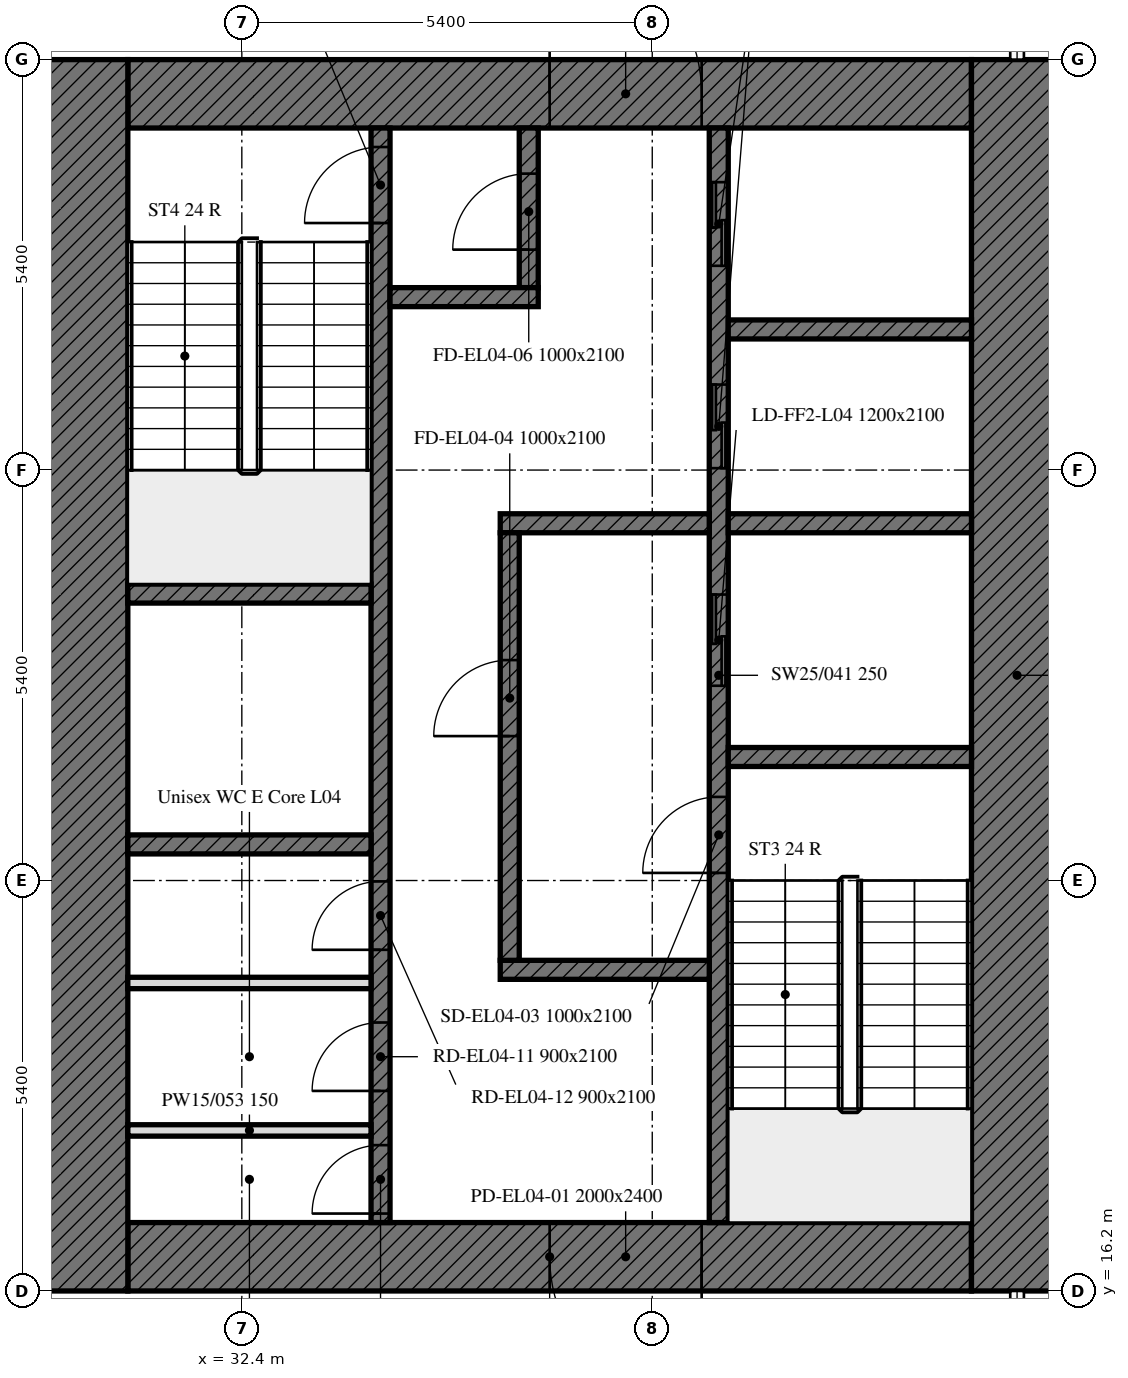
"""IFC4 building model, lengths in metres.
Left out: names, types, materials, properties, quantities, classifications, styles, units other than length and angle.
Written with IfcOpenShell. Run it as: python <this file> out.ifc"""

import sys

from ifc_helpers import new_model, si_unit, direction, frame, frame_2d, origin, place, context, subcontext, project, spatial, rectangle, extrude, element, fill, save


model = new_model("IFC4")
c1 = context("Model", 3, precision=1e-05, world=origin(), true_north=direction((0.0, 1.0)))
c2 = subcontext(c1, "Body", "Model", "MODEL_VIEW")
j1 = project(units=[si_unit("LENGTHUNIT", "METRE"), si_unit("PLANEANGLEUNIT", "RADIAN")], contexts=[c1])
p1 = place(None, origin())
s1 = spatial("IfcSite", under=j1, at=p1, CompositionType="ELEMENT")
p2 = place(p1, origin())
s2 = spatial("IfcBuilding", under=s1, at=p2, CompositionType="ELEMENT")
p3 = place(p2, frame((0.0, 0.0, 24.6)))
s3 = spatial("IfcBuildingStorey", under=s2, at=p3, CompositionType="ELEMENT", Elevation=24.6)
p4 = place(p3, frame((42.0, 16.65, 0.0), z_axis=(0.0, 0.0, 1.0), x_axis=(-1.0, 0.0, 0.0)))
e1 = element("IfcWall", 1, at=p4, inside=s3, PredefinedType="SOLIDWALL", context=c2, shape_type="SweptSolid", body=[
    extrude(rectangle(XDim=11.1, YDim=0.9, at=frame_2d((5.55, 0.0))), origin(), (0.0, 0.0, 1.0), 4.1),
])
p5 = place(p4, frame((3.55, 0.0, 0.0)))
e2 = element("IfcOpeningElement", 2, at=p5, cuts=e1, PredefinedType="OPENING", context=c2, shape_type="SweptSolid", body=[
    extrude(rectangle(XDim=2.0, YDim=2.4, at=frame_2d((1.0, 1.2))), frame((0.0, 0.45, 0.0), z_axis=(0.0, -1.0, 0.0), x_axis=(1.0, 0.0, 0.0)), (0.0, 0.0, 1.0), 0.9),
])
p6 = place(p3, frame((30.9, 31.95, 0.0), z_axis=(0.0, 0.0, 1.0), x_axis=(1.0, 0.0, 0.0)))
e3 = element("IfcWall", 3, at=p6, inside=s3, PredefinedType="SOLIDWALL", context=c2, shape_type="SweptSolid", body=[
    extrude(rectangle(XDim=11.1, YDim=0.9, at=frame_2d((5.55, 0.0))), origin(), (0.0, 0.0, 1.0), 4.1),
])
p7 = place(p6, frame((5.55, 0.0, 0.0)))
e4 = element("IfcOpeningElement", 4, at=p7, cuts=e3, PredefinedType="OPENING", context=c2, shape_type="SweptSolid", body=[
    extrude(rectangle(XDim=2.0, YDim=2.4, at=frame_2d((1.0, 1.2))), frame((0.0, 0.45, 0.0), z_axis=(0.0, -1.0, 0.0), x_axis=(1.0, 0.0, 0.0)), (0.0, 0.0, 1.0), 0.9),
])
for number, where, z_axis, x_axis in (
    (5, (42.6, 32.4, 0.0), (0.0, 0.0, 1.0), (0.0, -1.0, 0.0)),
    (6, (30.3, 16.2, 0.0), (0.0, 0.0, 1.0), (0.0, 1.0, 0.0)),
):
    element("IfcWall", number, at=place(p3, frame(where, z_axis=z_axis, x_axis=x_axis)), inside=s3, PredefinedType="SOLIDWALL", context=c2, shape_type="SweptSolid", body=[
        extrude(rectangle(XDim=16.2, YDim=1.2, at=frame_2d((8.1, 0.0))), origin(), (0.0, 0.0, 1.0), 4.1),
    ])
p8 = place(p3, frame((38.675, 17.1, 0.0), z_axis=(0.0, 0.0, 1.0), x_axis=(0.0, 1.0, 0.0)))
e7 = element("IfcWall", 7, at=p8, inside=s3, PredefinedType="SOLIDWALL", context=c2, shape_type="SweptSolid", body=[
    extrude(rectangle(XDim=14.4, YDim=0.25, at=frame_2d((7.2, 0.0))), origin(), (0.0, 0.0, 1.0), 4.1),
])
p9 = place(p8, frame((4.6, 0.0, 0.0)))
e8 = element("IfcOpeningElement", 8, at=p9, cuts=e7, PredefinedType="OPENING", context=c2, shape_type="SweptSolid", body=[
    extrude(rectangle(XDim=1.0, YDim=2.1, at=frame_2d((0.5, 1.05))), frame((0.0, 0.125, 0.0), z_axis=(0.0, -1.0, 0.0), x_axis=(1.0, 0.0, 0.0)), (0.0, 0.0, 1.0), 0.25),
])
p10 = place(p8, frame((7.062, 0.0, 0.0)))
e9 = element("IfcOpeningElement", 9, at=p10, cuts=e7, PredefinedType="OPENING", context=c2, shape_type="SweptSolid", body=[
    extrude(rectangle(XDim=1.2, YDim=2.1, at=frame_2d((0.6, 1.05))), frame((0.0, 0.125, 0.0), z_axis=(0.0, -1.0, 0.0), x_axis=(1.0, 0.0, 0.0)), (0.0, 0.0, 1.0), 0.25),
])
p11 = place(p8, frame((9.925, 0.0, 0.0)))
e10 = element("IfcOpeningElement", 10, at=p11, cuts=e7, PredefinedType="OPENING", context=c2, shape_type="SweptSolid", body=[
    extrude(rectangle(XDim=1.1, YDim=2.1, at=frame_2d((0.55, 1.05))), frame((0.0, 0.125, 0.0), z_axis=(0.0, -1.0, 0.0), x_axis=(1.0, 0.0, 0.0)), (0.0, 0.0, 1.0), 0.25),
])
p12 = place(p8, frame((12.587, 0.0, 0.0)))
e11 = element("IfcOpeningElement", 11, at=p12, cuts=e7, PredefinedType="OPENING", context=c2, shape_type="SweptSolid", body=[
    extrude(rectangle(XDim=1.1, YDim=2.1, at=frame_2d((0.55, 1.05))), frame((0.0, 0.125, 0.0), z_axis=(0.0, -1.0, 0.0), x_axis=(1.0, 0.0, 0.0)), (0.0, 0.0, 1.0), 0.25),
])
p13 = place(p3, frame((34.225, 17.1, 0.0), z_axis=(0.0, 0.0, 1.0), x_axis=(0.0, 1.0, 0.0)))
e12 = element("IfcWall", 12, at=p13, inside=s3, PredefinedType="SOLIDWALL", context=c2, shape_type="SweptSolid", body=[
    extrude(rectangle(XDim=14.4, YDim=0.25, at=frame_2d((7.2, 0.0))), origin(), (0.0, 0.0, 1.0), 4.1),
])
p14 = place(p13, frame((13.15, 0.0, 0.0)))
e13 = element("IfcOpeningElement", 13, at=p14, cuts=e12, PredefinedType="OPENING", context=c2, shape_type="SweptSolid", body=[
    extrude(rectangle(XDim=1.0, YDim=2.1, at=frame_2d((0.5, 1.05))), frame((0.0, 0.125, 0.0), z_axis=(0.0, -1.0, 0.0), x_axis=(1.0, 0.0, 0.0)), (0.0, 0.0, 1.0), 0.25),
])
p15 = place(p13, frame((0.118, 0.0, 0.0)))
e14 = element("IfcOpeningElement", 14, at=p15, cuts=e12, PredefinedType="OPENING", context=c2, shape_type="SweptSolid", body=[
    extrude(rectangle(XDim=0.9, YDim=2.1, at=frame_2d((0.45, 1.05))), frame((0.0, 0.125, 0.0), z_axis=(0.0, -1.0, 0.0), x_axis=(1.0, 0.0, 0.0)), (0.0, 0.0, 1.0), 0.25),
])
p16 = place(p13, frame((1.732, 0.0, 0.0)))
e15 = element("IfcOpeningElement", 15, at=p16, cuts=e12, PredefinedType="OPENING", context=c2, shape_type="SweptSolid", body=[
    extrude(rectangle(XDim=0.9, YDim=2.1, at=frame_2d((0.45, 1.05))), frame((0.0, 0.125, 0.0), z_axis=(0.0, -1.0, 0.0), x_axis=(1.0, 0.0, 0.0)), (0.0, 0.0, 1.0), 0.25),
])
p17 = place(p13, frame((3.588, 0.0, 0.0)))
e16 = element("IfcOpeningElement", 16, at=p17, cuts=e12, PredefinedType="OPENING", context=c2, shape_type="SweptSolid", body=[
    extrude(rectangle(XDim=0.9, YDim=2.1, at=frame_2d((0.45, 1.05))), frame((0.0, 0.125, 0.0), z_axis=(0.0, -1.0, 0.0), x_axis=(1.0, 0.0, 0.0)), (0.0, 0.0, 1.0), 0.25),
])
p18 = place(p3, frame((38.8, 23.225, 0.0), z_axis=(0.0, 0.0, 1.0), x_axis=(1.0, 0.0, 0.0)))
e17 = element("IfcWall", 17, at=p18, inside=s3, PredefinedType="SOLIDWALL", context=c2, shape_type="SweptSolid", body=[
    extrude(rectangle(XDim=3.2, YDim=0.25, at=frame_2d((1.6, 0.0))), origin(), (0.0, 0.0, 1.0), 4.1),
])
for number, where, z_axis, x_axis in (
    (18, (30.9, 25.375, 0.0), (0.0, 0.0, 1.0), (1.0, 0.0, 0.0)),
    (19, (30.9, 22.075, 0.0), (0.0, 0.0, 1.0), (1.0, 0.0, 0.0)),
):
    element("IfcWall", number, at=place(p3, frame(where, z_axis=z_axis, x_axis=x_axis)), inside=s3, PredefinedType="SOLIDWALL", context=c2, shape_type="SweptSolid", body=[
        extrude(rectangle(XDim=3.2, YDim=0.25, at=frame_2d((1.6, 0.0))), origin(), (0.0, 0.0, 1.0), 4.1),
    ])
p19 = place(p3, frame((38.8, 26.3, 0.0), z_axis=(0.0, 0.0, 1.0), x_axis=(1.0, 0.0, 0.0)))
e20 = element("IfcWall", 20, at=p19, inside=s3, PredefinedType="SOLIDWALL", context=c2, shape_type="SweptSolid", body=[
    extrude(rectangle(XDim=3.2, YDim=0.25, at=frame_2d((1.6, 0.0))), origin(), (0.0, 0.0, 1.0), 4.1),
])
for number, where, z_axis, x_axis in (
    (21, (35.8, 26.3, 0.0), (0.0, 0.0, 1.0), (1.0, 0.0, 0.0)),
    (22, (35.8, 20.425, 0.0), (0.0, 0.0, 1.0), (1.0, 0.0, 0.0)),
):
    element("IfcWall", number, at=place(p3, frame(where, z_axis=z_axis, x_axis=x_axis)), inside=s3, PredefinedType="SOLIDWALL", context=c2, shape_type="SweptSolid", body=[
        extrude(rectangle(XDim=2.75, YDim=0.25, at=frame_2d((1.375, 0.0))), origin(), (0.0, 0.0, 1.0), 4.1),
    ])
p20 = place(p3, frame((36.175, 29.4, 0.0), z_axis=(0.0, 0.0, 1.0), x_axis=(0.0, 1.0, 0.0)))
e23 = element("IfcWall", 23, at=p20, inside=s3, PredefinedType="SOLIDWALL", context=c2, shape_type="SweptSolid", body=[
    extrude(rectangle(XDim=2.1, YDim=0.25, at=frame_2d((1.05, 0.0))), origin(), (0.0, 0.0, 1.0), 4.1),
])
p21 = place(p20, frame((0.5, 0.0, 0.0)))
e24 = element("IfcOpeningElement", 24, at=p21, cuts=e23, PredefinedType="OPENING", context=c2, shape_type="SweptSolid", body=[
    extrude(rectangle(XDim=1.0, YDim=2.1, at=frame_2d((0.5, 1.05))), frame((0.0, 0.125, 0.0), z_axis=(0.0, -1.0, 0.0), x_axis=(1.0, 0.0, 0.0)), (0.0, 0.0, 1.0), 0.25),
])
p22 = place(p3, frame((34.35, 29.275, 0.0), z_axis=(0.0, 0.0, 1.0), x_axis=(1.0, 0.0, 0.0)))
e25 = element("IfcWall", 25, at=p22, inside=s3, PredefinedType="SOLIDWALL", context=c2, shape_type="SweptSolid", body=[
    extrude(rectangle(XDim=1.95, YDim=0.25, at=frame_2d((0.975, 0.0))), origin(), (0.0, 0.0, 1.0), 4.1),
])
p23 = place(p3, frame((35.925, 20.55, 0.0), z_axis=(0.0, 0.0, 1.0), x_axis=(0.0, 1.0, 0.0)))
e26 = element("IfcWall", 26, at=p23, inside=s3, PredefinedType="SOLIDWALL", context=c2, shape_type="SweptSolid", body=[
    extrude(rectangle(XDim=5.625, YDim=0.25, at=frame_2d((2.812, 0.0))), origin(), (0.0, 0.0, 1.0), 4.1),
])
p24 = place(p23, frame((2.95, 0.0, 0.0)))
e27 = element("IfcOpeningElement", 27, at=p24, cuts=e26, PredefinedType="OPENING", context=c2, shape_type="SweptSolid", body=[
    extrude(rectangle(XDim=1.0, YDim=2.1, at=frame_2d((0.5, 1.05))), frame((0.0, 0.125, 0.0), z_axis=(0.0, -1.0, 0.0), x_axis=(1.0, 0.0, 0.0)), (0.0, 0.0, 1.0), 0.25),
])
p25 = place(p3, frame((38.8, 28.85, 0.0), z_axis=(0.0, 0.0, 1.0), x_axis=(1.0, 0.0, 0.0)))
e28 = element("IfcWall", 28, at=p25, inside=s3, PredefinedType="SOLIDWALL", context=c2, shape_type="SweptSolid", body=[
    extrude(rectangle(XDim=3.2, YDim=0.25, at=frame_2d((1.6, 0.0))), origin(), (0.0, 0.0, 1.0), 4.1),
])
for number, where, z_axis, x_axis in (
    (29, (30.9, 18.312, 0.0), (0.0, 0.0, 1.0), (1.0, 0.0, 0.0)),
    (30, (30.9, 20.252, 0.0), (0.0, 0.0, 1.0), (1.0, 0.0, 0.0)),
):
    element("IfcWall", number, at=place(p3, frame(where, z_axis=z_axis, x_axis=x_axis)), inside=s3, PredefinedType="PARTITIONING", context=c2, shape_type="SweptSolid", body=[
        extrude(rectangle(XDim=3.2, YDim=0.15, at=frame_2d((1.6, 0.0))), origin(), (0.0, 0.0, 1.0), 4.1),
    ])
p26 = place(p5, origin())
e31 = element("IfcDoor", 31, at=p26, inside=s3, OperationType="DOUBLE_DOOR_SINGLE_SWING", PredefinedType="DOOR", context=c2, shape_type="SweptSolid", body=[
    extrude(rectangle(XDim=2.0, YDim=2.4, at=frame_2d((1.0, 1.2))), frame((0.0, 0.025, 0.0), z_axis=(0.0, -1.0, 0.0), x_axis=(1.0, 0.0, 0.0)), (0.0, 0.0, 1.0), 0.05),
])
fill(e2, e31)
p27 = place(p7, origin())
e32 = element("IfcDoor", 32, at=p27, inside=s3, OperationType="DOUBLE_DOOR_SINGLE_SWING", PredefinedType="DOOR", context=c2, shape_type="SweptSolid", body=[
    extrude(rectangle(XDim=2.0, YDim=2.4, at=frame_2d((1.0, 1.2))), frame((0.0, 0.025, 0.0), z_axis=(0.0, -1.0, 0.0), x_axis=(1.0, 0.0, 0.0)), (0.0, 0.0, 1.0), 0.05),
])
fill(e4, e32)
p28 = place(p9, origin())
e33 = element("IfcDoor", 33, at=p28, inside=s3, OperationType="SINGLE_SWING_LEFT", PredefinedType="DOOR", context=c2, shape_type="SweptSolid", body=[
    extrude(rectangle(XDim=1.0, YDim=2.1, at=frame_2d((0.5, 1.05))), frame((0.0, 0.025, 0.0), z_axis=(0.0, -1.0, 0.0), x_axis=(1.0, 0.0, 0.0)), (0.0, 0.0, 1.0), 0.05),
])
fill(e8, e33)
p29 = place(p24, origin())
e34 = element("IfcDoor", 34, at=p29, inside=s3, OperationType="SINGLE_SWING_LEFT", PredefinedType="DOOR", context=c2, shape_type="SweptSolid", body=[
    extrude(rectangle(XDim=1.0, YDim=2.1, at=frame_2d((0.5, 1.05))), frame((0.0, 0.025, 0.0), z_axis=(0.0, -1.0, 0.0), x_axis=(1.0, 0.0, 0.0)), (0.0, 0.0, 1.0), 0.05),
])
fill(e27, e34)
p30 = place(p14, origin())
e35 = element("IfcDoor", 35, at=p30, inside=s3, OperationType="SINGLE_SWING_LEFT", PredefinedType="DOOR", context=c2, shape_type="SweptSolid", body=[
    extrude(rectangle(XDim=1.0, YDim=2.1, at=frame_2d((0.5, 1.05))), frame((0.0, 0.025, 0.0), z_axis=(0.0, -1.0, 0.0), x_axis=(1.0, 0.0, 0.0)), (0.0, 0.0, 1.0), 0.05),
])
fill(e13, e35)
p31 = place(p21, origin())
e36 = element("IfcDoor", 36, at=p31, inside=s3, OperationType="SINGLE_SWING_LEFT", PredefinedType="DOOR", context=c2, shape_type="SweptSolid", body=[
    extrude(rectangle(XDim=1.0, YDim=2.1, at=frame_2d((0.5, 1.05))), frame((0.0, 0.025, 0.0), z_axis=(0.0, -1.0, 0.0), x_axis=(1.0, 0.0, 0.0)), (0.0, 0.0, 1.0), 0.05),
])
fill(e24, e36)
p32 = place(p10, origin())
e37 = element("IfcDoor", 37, at=p32, inside=s3, OperationType="DOUBLE_DOOR_SLIDING", PredefinedType="DOOR", context=c2, shape_type="SweptSolid", body=[
    extrude(rectangle(XDim=1.2, YDim=2.1, at=frame_2d((0.6, 1.05))), frame((0.0, 0.025, 0.0), z_axis=(0.0, -1.0, 0.0), x_axis=(1.0, 0.0, 0.0)), (0.0, 0.0, 1.0), 0.05),
])
fill(e9, e37)
p33 = place(p11, origin())
e38 = element("IfcDoor", 38, at=p33, inside=s3, OperationType="DOUBLE_DOOR_SLIDING", PredefinedType="DOOR", context=c2, shape_type="SweptSolid", body=[
    extrude(rectangle(XDim=1.1, YDim=2.1, at=frame_2d((0.55, 1.05))), frame((0.0, 0.025, 0.0), z_axis=(0.0, -1.0, 0.0), x_axis=(1.0, 0.0, 0.0)), (0.0, 0.0, 1.0), 0.05),
])
fill(e10, e38)
p34 = place(p12, origin())
e39 = element("IfcDoor", 39, at=p34, inside=s3, OperationType="DOUBLE_DOOR_SLIDING", PredefinedType="DOOR", context=c2, shape_type="SweptSolid", body=[
    extrude(rectangle(XDim=1.1, YDim=2.1, at=frame_2d((0.55, 1.05))), frame((0.0, 0.025, 0.0), z_axis=(0.0, -1.0, 0.0), x_axis=(1.0, 0.0, 0.0)), (0.0, 0.0, 1.0), 0.05),
])
fill(e11, e39)
p35 = place(p15, origin())
e40 = element("IfcDoor", 40, at=p35, inside=s3, OperationType="SINGLE_SWING_LEFT", PredefinedType="DOOR", context=c2, shape_type="SweptSolid", body=[
    extrude(rectangle(XDim=0.9, YDim=2.1, at=frame_2d((0.45, 1.05))), frame((0.0, 0.025, 0.0), z_axis=(0.0, -1.0, 0.0), x_axis=(1.0, 0.0, 0.0)), (0.0, 0.0, 1.0), 0.05),
])
fill(e14, e40)
p36 = place(p16, origin())
e41 = element("IfcDoor", 41, at=p36, inside=s3, OperationType="SINGLE_SWING_LEFT", PredefinedType="DOOR", context=c2, shape_type="SweptSolid", body=[
    extrude(rectangle(XDim=0.9, YDim=2.1, at=frame_2d((0.45, 1.05))), frame((0.0, 0.025, 0.0), z_axis=(0.0, -1.0, 0.0), x_axis=(1.0, 0.0, 0.0)), (0.0, 0.0, 1.0), 0.05),
])
fill(e15, e41)
p37 = place(p17, origin())
e42 = element("IfcDoor", 42, at=p37, inside=s3, OperationType="SINGLE_SWING_LEFT", PredefinedType="DOOR", context=c2, shape_type="SweptSolid", body=[
    extrude(rectangle(XDim=0.9, YDim=2.1, at=frame_2d((0.45, 1.05))), frame((0.0, 0.025, 0.0), z_axis=(0.0, -1.0, 0.0), x_axis=(1.0, 0.0, 0.0)), (0.0, 0.0, 1.0), 0.05),
])
fill(e16, e42)
save(model, sys.argv[1])
